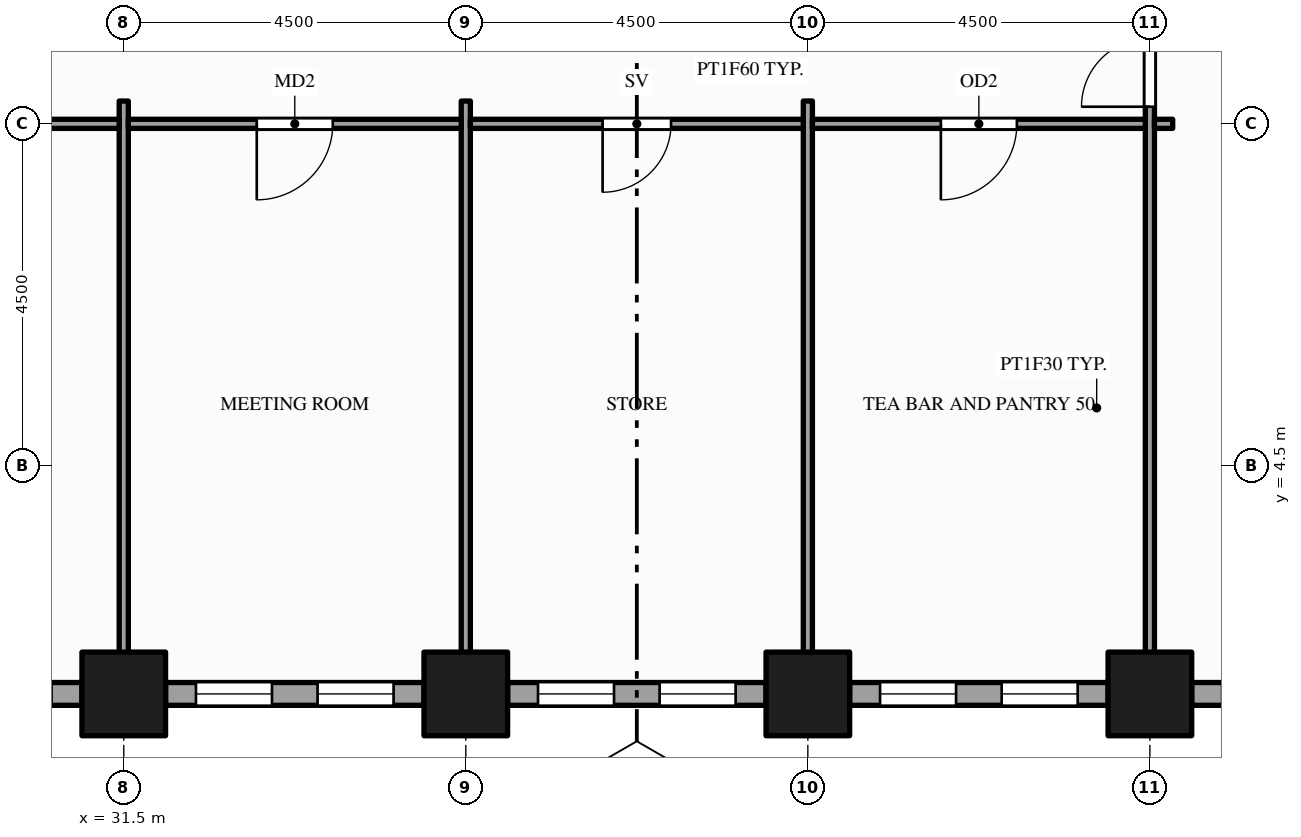
"""IFC4 building model, lengths in metres.
Left out: names, types, materials, properties, quantities, classifications, styles, units other than length and angle.
Written with IfcOpenShell. Run it as: python <this file> out.ifc"""

import sys

from ifc_helpers import new_model, si_unit, direction, frame, frame_2d, origin, origin_2d, place, context, subcontext, project, spatial, rectangle, hollow_rectangle, extrude, element, fill, save


model = new_model("IFC4")
c1 = context("Model", 3, precision=1e-05, world=origin(), true_north=direction((0.0, 1.0)))
c2 = subcontext(c1, "Body", "Model", "MODEL_VIEW")
j1 = project(units=[si_unit("LENGTHUNIT", "METRE"), si_unit("PLANEANGLEUNIT", "RADIAN")], contexts=[c1])
p1 = place(None, origin())
s1 = spatial("IfcSite", under=j1, at=p1, CompositionType="ELEMENT")
p2 = place(p1, origin())
s2 = spatial("IfcBuilding", under=s1, at=p2, CompositionType="ELEMENT")
p3 = place(p2, frame((0.0, 0.0, 61.0)))
s3 = spatial("IfcBuildingStorey", under=s2, at=p3, CompositionType="ELEMENT", Elevation=61.0)
for number, where, z_axis, x_axis in (
    (1, (31.5, 1.5, -0.15), (0.0, 0.0, 1.0), (1.0, 0.0, 0.0)),
    (2, (36.0, 1.5, -0.15), (0.0, 0.0, 1.0), (1.0, 0.0, 0.0)),
    (3, (40.5, 1.5, -0.15), (0.0, 0.0, 1.0), (1.0, 0.0, 0.0)),
    (4, (45.0, 1.5, -0.15), (0.0, 0.0, 1.0), (1.0, 0.0, 0.0)),
):
    element("IfcColumn", number, at=place(p3, frame(where, z_axis=z_axis, x_axis=x_axis)), inside=s3, PredefinedType="COLUMN", context=c2, shape_type="SweptSolid", body=[
        extrude(hollow_rectangle(XDim=1.1, YDim=1.1, WallThickness=0.06, at=origin_2d()), origin(), (0.0, 0.0, 1.0), 4.0),
    ])
p4 = place(p3, frame((27.55, 1.5, 0.0), z_axis=(0.0, 0.0, 1.0), x_axis=(1.0, 0.0, 0.0)))
e5 = element("IfcWall", 5, at=p4, inside=s3, PredefinedType="STANDARD", context=c2, shape_type="SweptSolid", body=[
    extrude(rectangle(XDim=3.4, YDim=0.3, at=frame_2d((1.7, 0.0))), origin(), (0.0, 0.0, 1.0), 3.144),
])
p5 = place(p4, frame((0.4, 0.0, 0.9)))
e6 = element("IfcOpeningElement", 6, at=p5, cuts=e5, PredefinedType="OPENING", context=c2, shape_type="SweptSolid", body=[
    extrude(rectangle(XDim=1.0, YDim=2.0, at=frame_2d((0.5, 1.0))), frame((0.0, 0.16, 0.0), z_axis=(0.0, -1.0, 0.0), x_axis=(1.0, 0.0, 0.0)), (0.0, 0.0, 1.0), 0.32),
])
p6 = place(p4, frame((2.0, 0.0, 0.9)))
e7 = element("IfcOpeningElement", 7, at=p6, cuts=e5, PredefinedType="OPENING", context=c2, shape_type="SweptSolid", body=[
    extrude(rectangle(XDim=1.0, YDim=2.0, at=frame_2d((0.5, 1.0))), frame((0.0, 0.16, 0.0), z_axis=(0.0, -1.0, 0.0), x_axis=(1.0, 0.0, 0.0)), (0.0, 0.0, 1.0), 0.32),
])
p7 = place(p3, frame((32.05, 1.5, 0.0), z_axis=(0.0, 0.0, 1.0), x_axis=(1.0, 0.0, 0.0)))
e8 = element("IfcWall", 8, at=p7, inside=s3, PredefinedType="STANDARD", context=c2, shape_type="SweptSolid", body=[
    extrude(rectangle(XDim=3.4, YDim=0.3, at=frame_2d((1.7, 0.0))), origin(), (0.0, 0.0, 1.0), 3.144),
])
p8 = place(p7, frame((0.4, 0.0, 0.9)))
e9 = element("IfcOpeningElement", 9, at=p8, cuts=e8, PredefinedType="OPENING", context=c2, shape_type="SweptSolid", body=[
    extrude(rectangle(XDim=1.0, YDim=2.0, at=frame_2d((0.5, 1.0))), frame((0.0, 0.16, 0.0), z_axis=(0.0, -1.0, 0.0), x_axis=(1.0, 0.0, 0.0)), (0.0, 0.0, 1.0), 0.32),
])
p9 = place(p7, frame((2.0, 0.0, 0.9)))
e10 = element("IfcOpeningElement", 10, at=p9, cuts=e8, PredefinedType="OPENING", context=c2, shape_type="SweptSolid", body=[
    extrude(rectangle(XDim=1.0, YDim=2.0, at=frame_2d((0.5, 1.0))), frame((0.0, 0.16, 0.0), z_axis=(0.0, -1.0, 0.0), x_axis=(1.0, 0.0, 0.0)), (0.0, 0.0, 1.0), 0.32),
])
p10 = place(p3, frame((36.55, 1.5, 0.0), z_axis=(0.0, 0.0, 1.0), x_axis=(1.0, 0.0, 0.0)))
e11 = element("IfcWall", 11, at=p10, inside=s3, PredefinedType="STANDARD", context=c2, shape_type="SweptSolid", body=[
    extrude(rectangle(XDim=3.4, YDim=0.3, at=frame_2d((1.7, 0.0))), origin(), (0.0, 0.0, 1.0), 3.144),
])
p11 = place(p10, frame((0.4, 0.0, 0.9)))
e12 = element("IfcOpeningElement", 12, at=p11, cuts=e11, PredefinedType="OPENING", context=c2, shape_type="SweptSolid", body=[
    extrude(rectangle(XDim=1.0, YDim=2.0, at=frame_2d((0.5, 1.0))), frame((0.0, 0.16, 0.0), z_axis=(0.0, -1.0, 0.0), x_axis=(1.0, 0.0, 0.0)), (0.0, 0.0, 1.0), 0.32),
])
p12 = place(p10, frame((2.0, 0.0, 0.9)))
e13 = element("IfcOpeningElement", 13, at=p12, cuts=e11, PredefinedType="OPENING", context=c2, shape_type="SweptSolid", body=[
    extrude(rectangle(XDim=1.0, YDim=2.0, at=frame_2d((0.5, 1.0))), frame((0.0, 0.16, 0.0), z_axis=(0.0, -1.0, 0.0), x_axis=(1.0, 0.0, 0.0)), (0.0, 0.0, 1.0), 0.32),
])
p13 = place(p3, frame((41.05, 1.5, 0.0), z_axis=(0.0, 0.0, 1.0), x_axis=(1.0, 0.0, 0.0)))
e14 = element("IfcWall", 14, at=p13, inside=s3, PredefinedType="STANDARD", context=c2, shape_type="SweptSolid", body=[
    extrude(rectangle(XDim=3.4, YDim=0.3, at=frame_2d((1.7, 0.0))), origin(), (0.0, 0.0, 1.0), 3.144),
])
p14 = place(p13, frame((0.4, 0.0, 0.9)))
e15 = element("IfcOpeningElement", 15, at=p14, cuts=e14, PredefinedType="OPENING", context=c2, shape_type="SweptSolid", body=[
    extrude(rectangle(XDim=1.0, YDim=2.0, at=frame_2d((0.5, 1.0))), frame((0.0, 0.16, 0.0), z_axis=(0.0, -1.0, 0.0), x_axis=(1.0, 0.0, 0.0)), (0.0, 0.0, 1.0), 0.32),
])
p15 = place(p13, frame((2.0, 0.0, 0.9)))
e16 = element("IfcOpeningElement", 16, at=p15, cuts=e14, PredefinedType="OPENING", context=c2, shape_type="SweptSolid", body=[
    extrude(rectangle(XDim=1.0, YDim=2.0, at=frame_2d((0.5, 1.0))), frame((0.0, 0.16, 0.0), z_axis=(0.0, -1.0, 0.0), x_axis=(1.0, 0.0, 0.0)), (0.0, 0.0, 1.0), 0.32),
])
p16 = place(p3, frame((45.55, 1.5, 0.0), z_axis=(0.0, 0.0, 1.0), x_axis=(1.0, 0.0, 0.0)))
e17 = element("IfcWall", 17, at=p16, inside=s3, PredefinedType="STANDARD", context=c2, shape_type="SweptSolid", body=[
    extrude(rectangle(XDim=3.4, YDim=0.3, at=frame_2d((1.7, 0.0))), origin(), (0.0, 0.0, 1.0), 3.144),
])
p17 = place(p16, frame((0.4, 0.0, 0.9)))
e18 = element("IfcOpeningElement", 18, at=p17, cuts=e17, PredefinedType="OPENING", context=c2, shape_type="SweptSolid", body=[
    extrude(rectangle(XDim=1.0, YDim=2.0, at=frame_2d((0.5, 1.0))), frame((0.0, 0.16, 0.0), z_axis=(0.0, -1.0, 0.0), x_axis=(1.0, 0.0, 0.0)), (0.0, 0.0, 1.0), 0.32),
])
p18 = place(p16, frame((2.0, 0.0, 0.9)))
e19 = element("IfcOpeningElement", 19, at=p18, cuts=e17, PredefinedType="OPENING", context=c2, shape_type="SweptSolid", body=[
    extrude(rectangle(XDim=1.0, YDim=2.0, at=frame_2d((0.5, 1.0))), frame((0.0, 0.16, 0.0), z_axis=(0.0, -1.0, 0.0), x_axis=(1.0, 0.0, 0.0)), (0.0, 0.0, 1.0), 0.32),
])
for number, where, z_axis, x_axis in (
    (20, (31.5, 1.65, 0.0), (0.0, 0.0, 1.0), (0.0, 1.0, 0.0)),
    (21, (36.0, 1.65, 0.0), (0.0, 0.0, 1.0), (0.0, 1.0, 0.0)),
    (22, (40.5, 1.65, 0.0), (0.0, 0.0, 1.0), (0.0, 1.0, 0.0)),
):
    element("IfcWall", number, at=place(p3, frame(where, z_axis=z_axis, x_axis=x_axis)), inside=s3, PredefinedType="PARTITIONING", context=c2, shape_type="SweptSolid", body=[
        extrude(rectangle(XDim=7.65, YDim=0.12, at=frame_2d((3.825, 0.0))), origin(), (0.0, 0.0, 1.0), 2.938),
    ])
p19 = place(p3, frame((45.0, 1.65, 0.0), z_axis=(0.0, 0.0, 1.0), x_axis=(0.0, 1.0, 0.0)))
e23 = element("IfcWall", 23, at=p19, inside=s3, PredefinedType="PARTITIONING", context=c2, shape_type="SweptSolid", body=[
    extrude(rectangle(XDim=22.2, YDim=0.12, at=frame_2d((11.1, 0.0))), origin(), (0.0, 0.0, 1.0), 2.938),
])
p20 = place(p19, frame((7.575, 0.0, 0.0)))
e24 = element("IfcOpeningElement", 24, at=p20, cuts=e23, PredefinedType="OPENING", context=c2, shape_type="SweptSolid", body=[
    extrude(rectangle(XDim=1.8, YDim=2.1, at=frame_2d((0.9, 1.05))), frame((0.0, 0.07, 0.0), z_axis=(0.0, -1.0, 0.0), x_axis=(1.0, 0.0, 0.0)), (0.0, 0.0, 1.0), 0.14),
])
p21 = place(p19, frame((10.6, 0.0, 0.0)))
e25 = element("IfcOpeningElement", 25, at=p21, cuts=e23, PredefinedType="OPENING", context=c2, shape_type="SweptSolid", body=[
    extrude(rectangle(XDim=0.9, YDim=2.1, at=frame_2d((0.45, 1.05))), frame((0.0, 0.07, 0.0), z_axis=(0.0, -1.0, 0.0), x_axis=(1.0, 0.0, 0.0)), (0.0, 0.0, 1.0), 0.14),
])
p22 = place(p19, frame((15.525, 0.0, 0.0)))
e26 = element("IfcOpeningElement", 26, at=p22, cuts=e23, PredefinedType="OPENING", context=c2, shape_type="SweptSolid", body=[
    extrude(rectangle(XDim=0.9, YDim=2.1, at=frame_2d((0.45, 1.05))), frame((0.0, 0.07, 0.0), z_axis=(0.0, -1.0, 0.0), x_axis=(1.0, 0.0, 0.0)), (0.0, 0.0, 1.0), 0.14),
])
p23 = place(p19, frame((20.35, 0.0, 0.0)))
e27 = element("IfcOpeningElement", 27, at=p23, cuts=e23, PredefinedType="OPENING", context=c2, shape_type="SweptSolid", body=[
    extrude(rectangle(XDim=1.0, YDim=2.1, at=frame_2d((0.5, 1.05))), frame((0.0, 0.07, 0.0), z_axis=(0.0, -1.0, 0.0), x_axis=(1.0, 0.0, 0.0)), (0.0, 0.0, 1.0), 0.14),
])
p24 = place(p3, frame((13.56, 9.0, 0.0), z_axis=(0.0, 0.0, 1.0), x_axis=(1.0, 0.0, 0.0)))
e28 = element("IfcWall", 28, at=p24, inside=s3, PredefinedType="PARTITIONING", context=c2, shape_type="SweptSolid", body=[
    extrude(rectangle(XDim=17.88, YDim=0.12, at=frame_2d((8.94, 0.0))), origin(), (0.0, 0.0, 1.0), 2.938),
])
p25 = place(p24, frame((8.04, 0.0, 0.0)))
e29 = element("IfcOpeningElement", 29, at=p25, cuts=e28, PredefinedType="OPENING", context=c2, shape_type="SweptSolid", body=[
    extrude(rectangle(XDim=1.8, YDim=2.1, at=frame_2d((0.9, 1.05))), frame((0.0, 0.07, 0.0), z_axis=(0.0, -1.0, 0.0), x_axis=(1.0, 0.0, 0.0)), (0.0, 0.0, 1.0), 0.14),
])
p26 = place(p3, frame((31.56, 9.0, 0.0), z_axis=(0.0, 0.0, 1.0), x_axis=(1.0, 0.0, 0.0)))
e30 = element("IfcWall", 30, at=p26, inside=s3, PredefinedType="PARTITIONING", context=c2, shape_type="SweptSolid", body=[
    extrude(rectangle(XDim=4.38, YDim=0.12, at=frame_2d((2.19, 0.0))), origin(), (0.0, 0.0, 1.0), 2.938),
])
p27 = place(p26, frame((1.69, 0.0, 0.0)))
e31 = element("IfcOpeningElement", 31, at=p27, cuts=e30, PredefinedType="OPENING", context=c2, shape_type="SweptSolid", body=[
    extrude(rectangle(XDim=1.0, YDim=2.1, at=frame_2d((0.5, 1.05))), frame((0.0, 0.07, 0.0), z_axis=(0.0, -1.0, 0.0), x_axis=(1.0, 0.0, 0.0)), (0.0, 0.0, 1.0), 0.14),
])
p28 = place(p3, frame((36.06, 9.0, 0.0), z_axis=(0.0, 0.0, 1.0), x_axis=(1.0, 0.0, 0.0)))
e32 = element("IfcWall", 32, at=p28, inside=s3, PredefinedType="PARTITIONING", context=c2, shape_type="SweptSolid", body=[
    extrude(rectangle(XDim=4.38, YDim=0.12, at=frame_2d((2.19, 0.0))), origin(), (0.0, 0.0, 1.0), 2.938),
])
p29 = place(p28, frame((1.74, 0.0, 0.0)))
e33 = element("IfcOpeningElement", 33, at=p29, cuts=e32, PredefinedType="OPENING", context=c2, shape_type="SweptSolid", body=[
    extrude(rectangle(XDim=0.9, YDim=2.1, at=frame_2d((0.45, 1.05))), frame((0.0, 0.07, 0.0), z_axis=(0.0, -1.0, 0.0), x_axis=(1.0, 0.0, 0.0)), (0.0, 0.0, 1.0), 0.14),
])
p30 = place(p3, frame((40.56, 9.0, 0.0), z_axis=(0.0, 0.0, 1.0), x_axis=(1.0, 0.0, 0.0)))
e34 = element("IfcWall", 34, at=p30, inside=s3, PredefinedType="PARTITIONING", context=c2, shape_type="SweptSolid", body=[
    extrude(rectangle(XDim=4.38, YDim=0.12, at=frame_2d((2.19, 0.0))), origin(), (0.0, 0.0, 1.0), 2.938),
])
p31 = place(p30, frame((1.69, 0.0, 0.0)))
e35 = element("IfcOpeningElement", 35, at=p31, cuts=e34, PredefinedType="OPENING", context=c2, shape_type="SweptSolid", body=[
    extrude(rectangle(XDim=1.0, YDim=2.1, at=frame_2d((0.5, 1.05))), frame((0.0, 0.07, 0.0), z_axis=(0.0, -1.0, 0.0), x_axis=(1.0, 0.0, 0.0)), (0.0, 0.0, 1.0), 0.14),
])
p32 = place(p3, frame((45.06, 9.0, 0.0), z_axis=(0.0, 0.0, 1.0), x_axis=(1.0, 0.0, 0.0)))
e36 = element("IfcWall", 36, at=p32, inside=s3, PredefinedType="PARTITIONING", context=c2, shape_type="SweptSolid", body=[
    extrude(rectangle(XDim=0.24, YDim=0.12, at=frame_2d((0.12, 0.0))), origin(), (0.0, 0.0, 1.0), 2.938),
])
p33 = place(p8, origin())
e37 = element("IfcWindow", 37, at=p33, inside=s3, PartitioningType="SINGLE_PANEL", PredefinedType="WINDOW", context=c2, shape_type="SweptSolid", body=[
    extrude(rectangle(XDim=1.0, YDim=2.0, at=frame_2d((0.5, 1.0))), frame((0.0, 0.03, 0.0), z_axis=(0.0, -1.0, 0.0), x_axis=(1.0, 0.0, 0.0)), (0.0, 0.0, 1.0), 0.06),
])
fill(e9, e37)
p34 = place(p9, origin())
e38 = element("IfcWindow", 38, at=p34, inside=s3, PartitioningType="SINGLE_PANEL", PredefinedType="WINDOW", context=c2, shape_type="SweptSolid", body=[
    extrude(rectangle(XDim=1.0, YDim=2.0, at=frame_2d((0.5, 1.0))), frame((0.0, 0.03, 0.0), z_axis=(0.0, -1.0, 0.0), x_axis=(1.0, 0.0, 0.0)), (0.0, 0.0, 1.0), 0.06),
])
fill(e10, e38)
p35 = place(p11, origin())
e39 = element("IfcWindow", 39, at=p35, inside=s3, PartitioningType="SINGLE_PANEL", PredefinedType="WINDOW", context=c2, shape_type="SweptSolid", body=[
    extrude(rectangle(XDim=1.0, YDim=2.0, at=frame_2d((0.5, 1.0))), frame((0.0, 0.03, 0.0), z_axis=(0.0, -1.0, 0.0), x_axis=(1.0, 0.0, 0.0)), (0.0, 0.0, 1.0), 0.06),
])
fill(e12, e39)
p36 = place(p12, origin())
e40 = element("IfcWindow", 40, at=p36, inside=s3, PartitioningType="SINGLE_PANEL", PredefinedType="WINDOW", context=c2, shape_type="SweptSolid", body=[
    extrude(rectangle(XDim=1.0, YDim=2.0, at=frame_2d((0.5, 1.0))), frame((0.0, 0.03, 0.0), z_axis=(0.0, -1.0, 0.0), x_axis=(1.0, 0.0, 0.0)), (0.0, 0.0, 1.0), 0.06),
])
fill(e13, e40)
p37 = place(p14, origin())
e41 = element("IfcWindow", 41, at=p37, inside=s3, PartitioningType="SINGLE_PANEL", PredefinedType="WINDOW", context=c2, shape_type="SweptSolid", body=[
    extrude(rectangle(XDim=1.0, YDim=2.0, at=frame_2d((0.5, 1.0))), frame((0.0, 0.03, 0.0), z_axis=(0.0, -1.0, 0.0), x_axis=(1.0, 0.0, 0.0)), (0.0, 0.0, 1.0), 0.06),
])
fill(e15, e41)
p38 = place(p15, origin())
e42 = element("IfcWindow", 42, at=p38, inside=s3, PartitioningType="SINGLE_PANEL", PredefinedType="WINDOW", context=c2, shape_type="SweptSolid", body=[
    extrude(rectangle(XDim=1.0, YDim=2.0, at=frame_2d((0.5, 1.0))), frame((0.0, 0.03, 0.0), z_axis=(0.0, -1.0, 0.0), x_axis=(1.0, 0.0, 0.0)), (0.0, 0.0, 1.0), 0.06),
])
fill(e16, e42)
p39 = place(p20, origin())
e43 = element("IfcDoor", 43, at=p39, inside=s3, OperationType="DOUBLE_DOOR_SINGLE_SWING", PredefinedType="DOOR", context=c2, shape_type="SweptSolid", body=[
    extrude(rectangle(XDim=1.8, YDim=2.1, at=frame_2d((0.9, 1.05))), frame((0.0, 0.025, 0.0), z_axis=(0.0, -1.0, 0.0), x_axis=(1.0, 0.0, 0.0)), (0.0, 0.0, 1.0), 0.05),
])
fill(e24, e43)
p40 = place(p27, origin())
e44 = element("IfcDoor", 44, at=p40, inside=s3, OperationType="SINGLE_SWING_LEFT", PredefinedType="DOOR", context=c2, shape_type="SweptSolid", body=[
    extrude(rectangle(XDim=1.0, YDim=2.1, at=frame_2d((0.5, 1.05))), frame((0.0, 0.025, 0.0), z_axis=(0.0, -1.0, 0.0), x_axis=(1.0, 0.0, 0.0)), (0.0, 0.0, 1.0), 0.05),
])
fill(e31, e44)
p41 = place(p29, origin())
e45 = element("IfcDoor", 45, at=p41, inside=s3, OperationType="SINGLE_SWING_LEFT", PredefinedType="DOOR", context=c2, shape_type="SweptSolid", body=[
    extrude(rectangle(XDim=0.9, YDim=2.1, at=frame_2d((0.45, 1.05))), frame((0.0, 0.025, 0.0), z_axis=(0.0, -1.0, 0.0), x_axis=(1.0, 0.0, 0.0)), (0.0, 0.0, 1.0), 0.05),
])
fill(e33, e45)
p42 = place(p31, origin())
e46 = element("IfcDoor", 46, at=p42, inside=s3, OperationType="SINGLE_SWING_LEFT", PredefinedType="DOOR", context=c2, shape_type="SweptSolid", body=[
    extrude(rectangle(XDim=1.0, YDim=2.1, at=frame_2d((0.5, 1.05))), frame((0.0, 0.025, 0.0), z_axis=(0.0, -1.0, 0.0), x_axis=(1.0, 0.0, 0.0)), (0.0, 0.0, 1.0), 0.05),
])
fill(e35, e46)
save(model, sys.argv[1])
